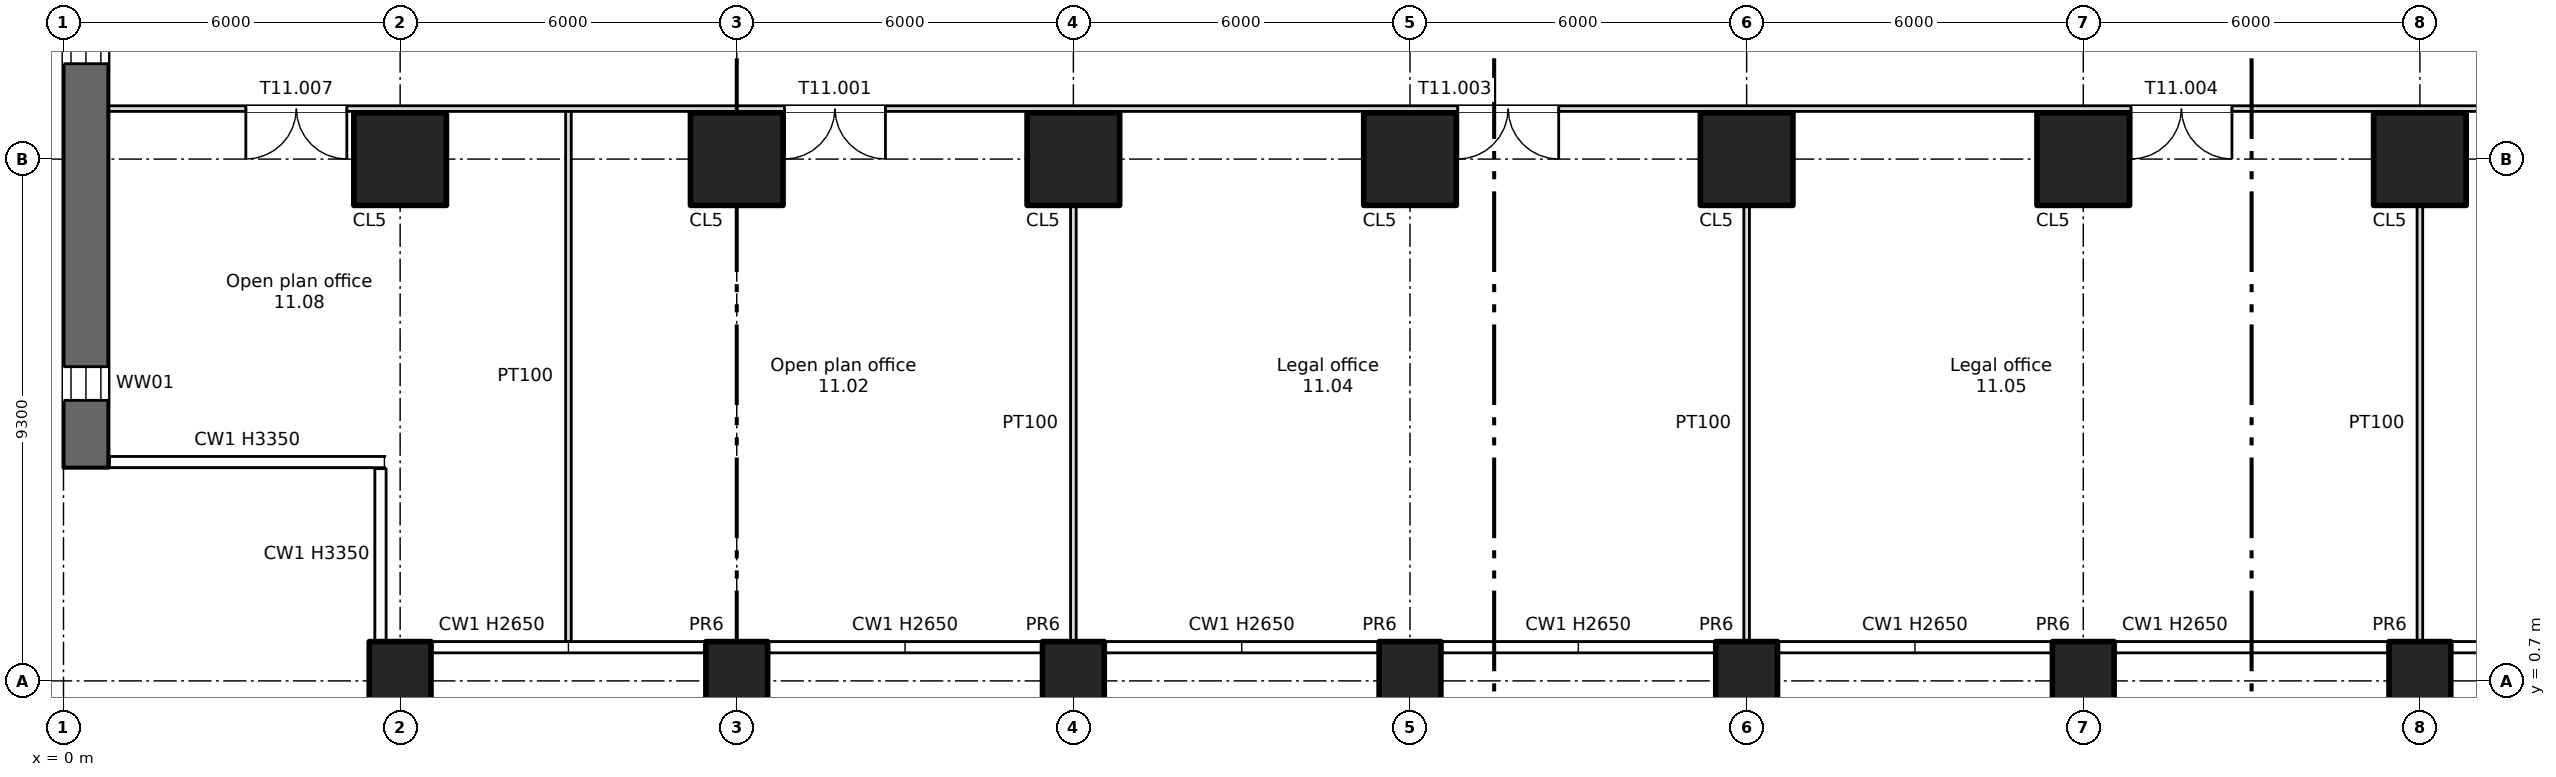
"""IFC4 building model, lengths in metres.
Left out: names, types, materials, properties, quantities, classifications, styles, units other than length and angle.
Written with IfcOpenShell. Run it as: python <this file> out.ifc"""

import sys

from ifc_helpers import new_model, si_unit, direction, frame, frame_2d, origin, origin_2d, place, context, subcontext, project, spatial, rectangle, extrude, element, fill, save


model = new_model("IFC4")
c1 = context("Model", 3, precision=1e-05, world=origin(), true_north=direction((0.0, 1.0)))
c2 = subcontext(c1, "Body", "Model", "MODEL_VIEW")
j1 = project(units=[si_unit("LENGTHUNIT", "METRE"), si_unit("PLANEANGLEUNIT", "RADIAN")], contexts=[c1])
p1 = place(None, origin())
s1 = spatial("IfcSite", under=j1, at=p1, CompositionType="ELEMENT")
p2 = place(p1, origin())
s2 = spatial("IfcBuilding", under=s1, at=p2, CompositionType="ELEMENT")
p3 = place(p2, frame((0.0, 0.0, 56.25)))
s3 = spatial("IfcBuildingStorey", under=s2, at=p3, CompositionType="ELEMENT", Elevation=56.25)
for number, where, z_axis, x_axis in (
    (1, (6.0, 0.7, -0.4), (0.0, 0.0, 1.0), (1.0, 0.0, 0.0)),
    (2, (12.0, 0.7, -0.4), (0.0, 0.0, 1.0), (1.0, 0.0, 0.0)),
    (3, (18.0, 0.7, -0.4), (0.0, 0.0, 1.0), (1.0, 0.0, 0.0)),
    (4, (24.0, 0.7, -0.4), (0.0, 0.0, 1.0), (1.0, 0.0, 0.0)),
    (5, (30.0, 0.7, -0.4), (0.0, 0.0, 1.0), (1.0, 0.0, 0.0)),
    (6, (36.0, 0.7, -0.4), (0.0, 0.0, 1.0), (1.0, 0.0, 0.0)),
    (7, (42.0, 0.7, -0.4), (0.0, 0.0, 1.0), (1.0, 0.0, 0.0)),
):
    element("IfcColumn", number, at=place(p3, frame(where, z_axis=z_axis, x_axis=x_axis)), inside=s3, PredefinedType="COLUMN", context=c2, shape_type="SweptSolid", body=[
        extrude(rectangle(XDim=1.1, YDim=1.4, at=origin_2d()), origin(), (0.0, 0.0, 1.0), 3.75),
    ])
for number, where, z_axis, x_axis in (
    (8, (6.0, 10.0, 0.0), (0.0, 0.0, 1.0), (1.0, 0.0, 0.0)),
    (9, (12.0, 10.0, 0.0), (0.0, 0.0, 1.0), (1.0, 0.0, 0.0)),
    (10, (18.0, 10.0, 0.0), (0.0, 0.0, 1.0), (1.0, 0.0, 0.0)),
    (11, (24.0, 10.0, 0.0), (0.0, 0.0, 1.0), (1.0, 0.0, 0.0)),
    (12, (30.0, 10.0, 0.0), (0.0, 0.0, 1.0), (1.0, 0.0, 0.0)),
    (13, (36.0, 10.0, 0.0), (0.0, 0.0, 1.0), (1.0, 0.0, 0.0)),
    (14, (42.0, 10.0, 0.0), (0.0, 0.0, 1.0), (1.0, 0.0, 0.0)),
):
    element("IfcColumn", number, at=place(p3, frame(where, z_axis=z_axis, x_axis=x_axis)), inside=s3, PredefinedType="COLUMN", context=c2, shape_type="SweptSolid", body=[
        extrude(rectangle(XDim=1.65, YDim=1.65, at=origin_2d()), origin(), (0.0, 0.0, 1.0), 3.35),
    ])
p4 = place(p3, frame((0.4, 4.5, 0.0), z_axis=(0.0, 0.0, 1.0), x_axis=(0.0, 1.0, 0.0)))
e15 = element("IfcWall", 15, at=p4, inside=s3, PredefinedType="SHEAR", context=c2, shape_type="SweptSolid", body=[
    extrude(rectangle(XDim=37.0, YDim=0.8, at=frame_2d((18.5, 0.0))), origin(), (0.0, 0.0, 1.0), 3.35),
])
p5 = place(p4, frame((1.2, 0.0, 0.6)))
e16 = element("IfcOpeningElement", 16, at=p5, cuts=e15, PredefinedType="OPENING", context=c2, shape_type="SweptSolid", body=[
    extrude(rectangle(XDim=0.6, YDim=2.4, at=frame_2d((0.3, 1.2))), frame((0.0, 0.41, 0.0), z_axis=(0.0, -1.0, 0.0), x_axis=(1.0, 0.0, 0.0)), (0.0, 0.0, 1.0), 0.82),
])
p6 = place(p4, frame((7.2, 0.0, 0.6)))
e17 = element("IfcOpeningElement", 17, at=p6, cuts=e15, PredefinedType="OPENING", context=c2, shape_type="SweptSolid", body=[
    extrude(rectangle(XDim=0.6, YDim=2.4, at=frame_2d((0.3, 1.2))), frame((0.0, 0.41, 0.0), z_axis=(0.0, -1.0, 0.0), x_axis=(1.0, 0.0, 0.0)), (0.0, 0.0, 1.0), 0.82),
])
p7 = place(p4, frame((13.2, 0.0, 0.6)))
e18 = element("IfcOpeningElement", 18, at=p7, cuts=e15, PredefinedType="OPENING", context=c2, shape_type="SweptSolid", body=[
    extrude(rectangle(XDim=0.6, YDim=2.4, at=frame_2d((0.3, 1.2))), frame((0.0, 0.41, 0.0), z_axis=(0.0, -1.0, 0.0), x_axis=(1.0, 0.0, 0.0)), (0.0, 0.0, 1.0), 0.82),
])
p8 = place(p4, frame((19.2, 0.0, 0.6)))
e19 = element("IfcOpeningElement", 19, at=p8, cuts=e15, PredefinedType="OPENING", context=c2, shape_type="SweptSolid", body=[
    extrude(rectangle(XDim=0.6, YDim=2.4, at=frame_2d((0.3, 1.2))), frame((0.0, 0.41, 0.0), z_axis=(0.0, -1.0, 0.0), x_axis=(1.0, 0.0, 0.0)), (0.0, 0.0, 1.0), 0.82),
])
p9 = place(p4, frame((25.2, 0.0, 0.6)))
e20 = element("IfcOpeningElement", 20, at=p9, cuts=e15, PredefinedType="OPENING", context=c2, shape_type="SweptSolid", body=[
    extrude(rectangle(XDim=0.6, YDim=2.4, at=frame_2d((0.3, 1.2))), frame((0.0, 0.41, 0.0), z_axis=(0.0, -1.0, 0.0), x_axis=(1.0, 0.0, 0.0)), (0.0, 0.0, 1.0), 0.82),
])
p10 = place(p4, frame((31.2, 0.0, 0.6)))
e21 = element("IfcOpeningElement", 21, at=p10, cuts=e15, PredefinedType="OPENING", context=c2, shape_type="SweptSolid", body=[
    extrude(rectangle(XDim=0.6, YDim=2.4, at=frame_2d((0.3, 1.2))), frame((0.0, 0.41, 0.0), z_axis=(0.0, -1.0, 0.0), x_axis=(1.0, 0.0, 0.0)), (0.0, 0.0, 1.0), 0.82),
])
p11 = place(p3, frame((0.8, 10.9, 0.0), z_axis=(0.0, 0.0, 1.0), x_axis=(1.0, 0.0, 0.0)))
e22 = element("IfcWall", 22, at=p11, inside=s3, PredefinedType="PARTITIONING", context=c2, shape_type="SweptSolid", body=[
    extrude(rectangle(XDim=76.4, YDim=0.1, at=frame_2d((38.2, 0.0))), origin(), (0.0, 0.0, 1.0), 3.35),
])
p12 = place(p11, frame((12.05, 0.0, 0.0)))
e23 = element("IfcOpeningElement", 23, at=p12, cuts=e22, PredefinedType="OPENING", context=c2, shape_type="SweptSolid", body=[
    extrude(rectangle(XDim=1.8, YDim=2.1, at=frame_2d((0.9, 1.05))), frame((0.0, 0.06, 0.0), z_axis=(0.0, -1.0, 0.0), x_axis=(1.0, 0.0, 0.0)), (0.0, 0.0, 1.0), 0.12),
])
p13 = place(p11, frame((56.55, 0.0, 0.0)))
e24 = element("IfcOpeningElement", 24, at=p13, cuts=e22, PredefinedType="OPENING", context=c2, shape_type="SweptSolid", body=[
    extrude(rectangle(XDim=1.8, YDim=2.1, at=frame_2d((0.9, 1.05))), frame((0.0, 0.06, 0.0), z_axis=(0.0, -1.0, 0.0), x_axis=(1.0, 0.0, 0.0)), (0.0, 0.0, 1.0), 0.12),
])
p14 = place(p11, frame((24.05, 0.0, 0.0)))
e25 = element("IfcOpeningElement", 25, at=p14, cuts=e22, PredefinedType="OPENING", context=c2, shape_type="SweptSolid", body=[
    extrude(rectangle(XDim=1.8, YDim=2.1, at=frame_2d((0.9, 1.05))), frame((0.0, 0.06, 0.0), z_axis=(0.0, -1.0, 0.0), x_axis=(1.0, 0.0, 0.0)), (0.0, 0.0, 1.0), 0.12),
])
p15 = place(p11, frame((36.05, 0.0, 0.0)))
e26 = element("IfcOpeningElement", 26, at=p15, cuts=e22, PredefinedType="OPENING", context=c2, shape_type="SweptSolid", body=[
    extrude(rectangle(XDim=1.8, YDim=2.1, at=frame_2d((0.9, 1.05))), frame((0.0, 0.06, 0.0), z_axis=(0.0, -1.0, 0.0), x_axis=(1.0, 0.0, 0.0)), (0.0, 0.0, 1.0), 0.12),
])
p16 = place(p11, frame((48.05, 0.0, 0.0)))
e27 = element("IfcOpeningElement", 27, at=p16, cuts=e22, PredefinedType="OPENING", context=c2, shape_type="SweptSolid", body=[
    extrude(rectangle(XDim=1.8, YDim=2.1, at=frame_2d((0.9, 1.05))), frame((0.0, 0.06, 0.0), z_axis=(0.0, -1.0, 0.0), x_axis=(1.0, 0.0, 0.0)), (0.0, 0.0, 1.0), 0.12),
])
p17 = place(p11, frame((68.4, 0.0, 0.0)))
e28 = element("IfcOpeningElement", 28, at=p17, cuts=e22, PredefinedType="OPENING", context=c2, shape_type="SweptSolid", body=[
    extrude(rectangle(XDim=1.8, YDim=2.1, at=frame_2d((0.9, 1.05))), frame((0.0, 0.06, 0.0), z_axis=(0.0, -1.0, 0.0), x_axis=(1.0, 0.0, 0.0)), (0.0, 0.0, 1.0), 0.12),
])
p18 = place(p11, frame((2.45, 0.0, 0.0)))
e29 = element("IfcOpeningElement", 29, at=p18, cuts=e22, PredefinedType="OPENING", context=c2, shape_type="SweptSolid", body=[
    extrude(rectangle(XDim=1.8, YDim=2.1, at=frame_2d((0.9, 1.05))), frame((0.0, 0.06, 0.0), z_axis=(0.0, -1.0, 0.0), x_axis=(1.0, 0.0, 0.0)), (0.0, 0.0, 1.0), 0.12),
])
p19 = place(p3, frame((9.0, 1.4, 0.0), z_axis=(0.0, 0.0, 1.0), x_axis=(0.0, 1.0, 0.0)))
e30 = element("IfcWall", 30, at=p19, inside=s3, PredefinedType="PARTITIONING", context=c2, shape_type="SweptSolid", body=[
    extrude(rectangle(XDim=9.45, YDim=0.1, at=frame_2d((4.725, 0.0))), origin(), (0.0, 0.0, 1.0), 3.35),
])
for number, where, z_axis, x_axis in (
    (31, (18.0, 1.4, 0.0), (0.0, 0.0, 1.0), (0.0, 1.0, 0.0)),
    (32, (30.0, 1.4, 0.0), (0.0, 0.0, 1.0), (0.0, 1.0, 0.0)),
    (33, (42.0, 1.4, 0.0), (0.0, 0.0, 1.0), (0.0, 1.0, 0.0)),
):
    element("IfcWall", number, at=place(p3, frame(where, z_axis=z_axis, x_axis=x_axis)), inside=s3, PredefinedType="PARTITIONING", context=c2, shape_type="SweptSolid", body=[
        extrude(rectangle(XDim=7.775, YDim=0.1, at=frame_2d((3.888, 0.0))), origin(), (0.0, 0.0, 1.0), 3.35),
    ])
p20 = place(p5, origin())
e34 = element("IfcWindow", 34, at=p20, inside=s3, PartitioningType="SINGLE_PANEL", PredefinedType="WINDOW", context=c2, shape_type="SweptSolid", body=[
    extrude(rectangle(XDim=0.6, YDim=2.4, at=frame_2d((0.3, 1.2))), frame((0.0, 0.03, 0.0), z_axis=(0.0, -1.0, 0.0), x_axis=(1.0, 0.0, 0.0)), (0.0, 0.0, 1.0), 0.06),
])
fill(e16, e34)
p21 = place(p6, origin())
e35 = element("IfcWindow", 35, at=p21, inside=s3, PartitioningType="SINGLE_PANEL", PredefinedType="WINDOW", context=c2, shape_type="SweptSolid", body=[
    extrude(rectangle(XDim=0.6, YDim=2.4, at=frame_2d((0.3, 1.2))), frame((0.0, 0.03, 0.0), z_axis=(0.0, -1.0, 0.0), x_axis=(1.0, 0.0, 0.0)), (0.0, 0.0, 1.0), 0.06),
])
fill(e17, e35)
p22 = place(p12, origin())
e36 = element("IfcDoor", 36, at=p22, inside=s3, OperationType="DOUBLE_DOOR_SINGLE_SWING", PredefinedType="DOOR", context=c2, shape_type="SweptSolid", body=[
    extrude(rectangle(XDim=1.8, YDim=2.1, at=frame_2d((0.9, 1.05))), frame((0.0, 0.025, 0.0), z_axis=(0.0, -1.0, 0.0), x_axis=(1.0, 0.0, 0.0)), (0.0, 0.0, 1.0), 0.05),
])
fill(e23, e36)
p23 = place(p14, origin())
e37 = element("IfcDoor", 37, at=p23, inside=s3, OperationType="DOUBLE_DOOR_SINGLE_SWING", PredefinedType="DOOR", context=c2, shape_type="SweptSolid", body=[
    extrude(rectangle(XDim=1.8, YDim=2.1, at=frame_2d((0.9, 1.05))), frame((0.0, 0.025, 0.0), z_axis=(0.0, -1.0, 0.0), x_axis=(1.0, 0.0, 0.0)), (0.0, 0.0, 1.0), 0.05),
])
fill(e25, e37)
p24 = place(p15, origin())
e38 = element("IfcDoor", 38, at=p24, inside=s3, OperationType="DOUBLE_DOOR_SINGLE_SWING", PredefinedType="DOOR", context=c2, shape_type="SweptSolid", body=[
    extrude(rectangle(XDim=1.8, YDim=2.1, at=frame_2d((0.9, 1.05))), frame((0.0, 0.025, 0.0), z_axis=(0.0, -1.0, 0.0), x_axis=(1.0, 0.0, 0.0)), (0.0, 0.0, 1.0), 0.05),
])
fill(e26, e38)
p25 = place(p18, origin())
e39 = element("IfcDoor", 39, at=p25, inside=s3, OperationType="DOUBLE_DOOR_SINGLE_SWING", PredefinedType="DOOR", context=c2, shape_type="SweptSolid", body=[
    extrude(rectangle(XDim=1.8, YDim=2.1, at=frame_2d((0.9, 1.05))), frame((0.0, 0.025, 0.0), z_axis=(0.0, -1.0, 0.0), x_axis=(1.0, 0.0, 0.0)), (0.0, 0.0, 1.0), 0.05),
])
fill(e29, e39)
save(model, sys.argv[1])
